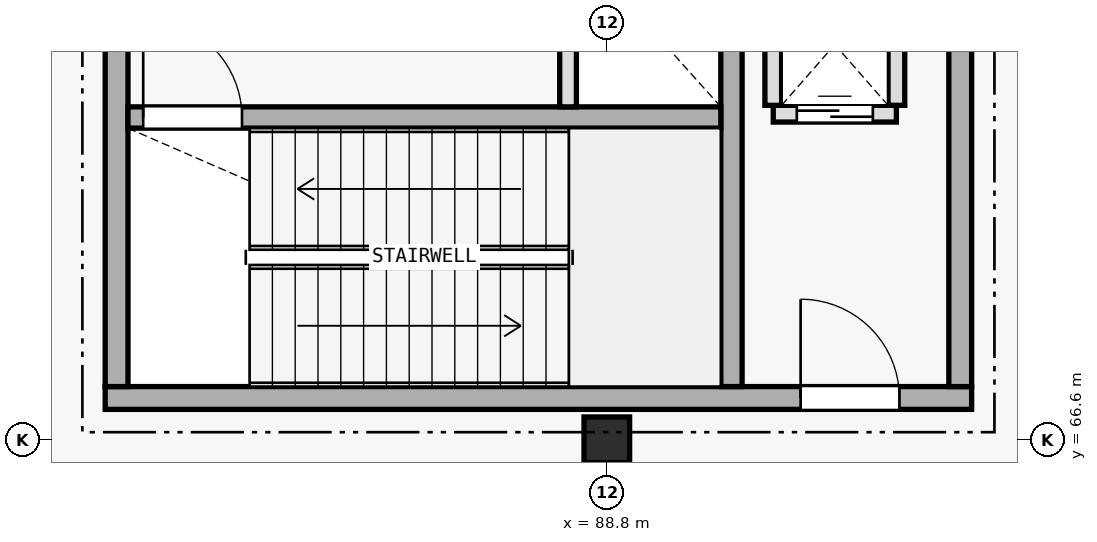
"""IFC4 building model, lengths in metres.
Left out: names, types, materials, properties, quantities, classifications, styles, units other than length and angle.
Written with IfcOpenShell. Run it as: python <this file> out.ifc"""

import sys

from ifc_helpers import new_model, si_unit, direction, frame, frame_2d, origin, origin_2d, place, context, subcontext, project, spatial, rectangle, extrude, element, fill, save


model = new_model("IFC4")
c1 = context("Model", 3, precision=1e-05, world=origin(), true_north=direction((0.0, 1.0)))
c2 = subcontext(c1, "Body", "Model", "MODEL_VIEW")
j1 = project(units=[si_unit("LENGTHUNIT", "METRE"), si_unit("PLANEANGLEUNIT", "RADIAN")], contexts=[c1])
p1 = place(None, origin())
s1 = spatial("IfcSite", under=j1, at=p1, CompositionType="ELEMENT")
p2 = place(p1, origin())
s2 = spatial("IfcBuilding", under=s1, at=p2, CompositionType="ELEMENT")
p3 = place(p2, origin())
s3 = spatial("IfcBuildingStorey", under=s2, at=p3, CompositionType="ELEMENT", Elevation=0.0)
p4 = place(p3, frame((82.2, 67.15, 0.0), z_axis=(0.0, 0.0, 1.0), x_axis=(1.0, 0.0, 0.0)))
e1 = element("IfcWall", 1, at=p4, inside=s3, PredefinedType="SHEAR", context=c2, shape_type="SweptSolid", body=[
    extrude(rectangle(XDim=11.4, YDim=0.3, at=frame_2d((5.7, 0.0))), origin(), (0.0, 0.0, 1.0), 5.395),
])
p5 = place(p4, frame((9.15, 0.0, 0.0)))
e2 = element("IfcOpeningElement", 2, at=p5, cuts=e1, PredefinedType="OPENING", context=c2, shape_type="SweptSolid", body=[
    extrude(rectangle(XDim=1.3, YDim=2.2, at=frame_2d((0.65, 1.1))), frame((0.0, 0.16, 0.0), z_axis=(0.0, -1.0, 0.0), x_axis=(1.0, 0.0, 0.0)), (0.0, 0.0, 1.0), 0.32),
])
for number, where, z_axis, x_axis in (
    (3, (82.35, 67.3, 0.0), (0.0, 0.0, 1.0), (0.0, 1.0, 0.0)),
    (4, (93.45, 67.3, 0.0), (0.0, 0.0, 1.0), (0.0, 1.0, 0.0)),
):
    element("IfcWall", number, at=place(p3, frame(where, z_axis=z_axis, x_axis=x_axis)), inside=s3, PredefinedType="SHEAR", context=c2, shape_type="SweptSolid", body=[
        extrude(rectangle(XDim=5.8, YDim=0.3, at=frame_2d((2.9, 0.0))), origin(), (0.0, 0.0, 1.0), 5.395),
    ])
p6 = place(p3, frame((90.44, 67.3, 0.0), z_axis=(0.0, 0.0, 1.0), x_axis=(0.0, 1.0, 0.0)))
e5 = element("IfcWall", 5, at=p6, inside=s3, PredefinedType="SHEAR", context=c2, shape_type="SweptSolid", body=[
    extrude(rectangle(XDim=5.8, YDim=0.28, at=frame_2d((2.9, 0.0))), origin(), (0.0, 0.0, 1.0), 5.395),
])
p7 = place(p3, frame((82.5, 70.84, 0.0), z_axis=(0.0, 0.0, 1.0), x_axis=(1.0, 0.0, 0.0)))
e6 = element("IfcWall", 6, at=p7, inside=s3, PredefinedType="SHEAR", context=c2, shape_type="SweptSolid", body=[
    extrude(rectangle(XDim=7.8, YDim=0.28, at=frame_2d((3.9, 0.0))), origin(), (0.0, 0.0, 1.0), 5.395),
])
p8 = place(p7, frame((0.2, 0.0, 0.0)))
e7 = element("IfcOpeningElement", 7, at=p8, cuts=e6, PredefinedType="OPENING", context=c2, shape_type="SweptSolid", body=[
    extrude(rectangle(XDim=1.3, YDim=2.2, at=frame_2d((0.65, 1.1))), frame((0.0, 0.15, 0.0), z_axis=(0.0, -1.0, 0.0), x_axis=(1.0, 0.0, 0.0)), (0.0, 0.0, 1.0), 0.3),
])
p9 = place(p3, frame((88.8, 66.6, 0.0), z_axis=(0.0, 0.0, 1.0), x_axis=(1.0, 0.0, 0.0)))
e8 = element("IfcColumn", 8, at=p9, inside=s3, PredefinedType="COLUMN", context=c2, shape_type="SweptSolid", body=[
    extrude(rectangle(XDim=0.6, YDim=0.6, at=origin_2d()), origin(), (0.0, 0.0, 1.0), 5.4),
])
p10 = place(p3, frame((90.99, 70.89, 0.0), z_axis=(0.0, 0.0, 1.0), x_axis=(1.0, 0.0, 0.0)))
e9 = element("IfcWall", 9, at=p10, inside=s3, PredefinedType="PLUMBINGWALL", context=c2, shape_type="SweptSolid", body=[
    extrude(rectangle(XDim=1.62, YDim=0.22, at=frame_2d((0.81, 0.0))), origin(), (0.0, 0.0, 1.0), 5.14),
])
p11 = place(p10, frame((0.31, 0.0, 0.0)))
e10 = element("IfcOpeningElement", 10, at=p11, cuts=e9, PredefinedType="OPENING", context=c2, shape_type="SweptSolid", body=[
    extrude(rectangle(XDim=1.0, YDim=2.2, at=frame_2d((0.5, 1.1))), frame((0.0, 0.12, 0.0), z_axis=(0.0, -1.0, 0.0), x_axis=(1.0, 0.0, 0.0)), (0.0, 0.0, 1.0), 0.24),
])
for number, where, z_axis, x_axis in (
    (11, (90.99, 71.0, 0.0), (0.0, 0.0, 1.0), (0.0, 1.0, 0.0)),
    (12, (92.61, 71.0, 0.0), (0.0, 0.0, 1.0), (0.0, 1.0, 0.0)),
):
    element("IfcWall", number, at=place(p3, frame(where, z_axis=z_axis, x_axis=x_axis)), inside=s3, PredefinedType="PLUMBINGWALL", context=c2, shape_type="SweptSolid", body=[
        extrude(rectangle(XDim=1.6, YDim=0.22, at=frame_2d((0.8, 0.0))), origin(), (0.0, 0.0, 1.0), 5.14),
    ])
p12 = place(p3, frame((88.29, 70.98, 0.0), z_axis=(0.0, 0.0, 1.0), x_axis=(0.0, 1.0, 0.0)))
e13 = element("IfcWall", 13, at=p12, inside=s3, PredefinedType="PLUMBINGWALL", context=c2, shape_type="SweptSolid", body=[
    extrude(rectangle(XDim=2.12, YDim=0.22, at=frame_2d((1.06, 0.0))), origin(), (0.0, 0.0, 1.0), 5.14),
])
p13 = place(p8, origin())
e14 = element("IfcDoor", 14, at=p13, inside=s3, OperationType="SINGLE_SWING_LEFT", PredefinedType="DOOR", context=c2, shape_type="SweptSolid", body=[
    extrude(rectangle(XDim=1.3, YDim=2.2, at=frame_2d((0.65, 1.1))), frame((0.0, 0.025, 0.0), z_axis=(0.0, -1.0, 0.0), x_axis=(1.0, 0.0, 0.0)), (0.0, 0.0, 1.0), 0.05),
])
fill(e7, e14)
p14 = place(p11, origin())
e15 = element("IfcDoor", 15, at=p14, inside=s3, OperationType="DOUBLE_DOOR_SLIDING", PredefinedType="DOOR", context=c2, shape_type="SweptSolid", body=[
    extrude(rectangle(XDim=1.0, YDim=2.2, at=frame_2d((0.5, 1.1))), frame((0.0, 0.025, 0.0), z_axis=(0.0, -1.0, 0.0), x_axis=(1.0, 0.0, 0.0)), (0.0, 0.0, 1.0), 0.05),
])
fill(e10, e15)
p15 = place(p5, origin())
e16 = element("IfcDoor", 16, at=p15, inside=s3, OperationType="SINGLE_SWING_LEFT", PredefinedType="DOOR", context=c2, shape_type="SweptSolid", body=[
    extrude(rectangle(XDim=1.3, YDim=2.2, at=frame_2d((0.65, 1.1))), frame((0.0, 0.025, 0.0), z_axis=(0.0, -1.0, 0.0), x_axis=(1.0, 0.0, 0.0)), (0.0, 0.0, 1.0), 0.05),
])
fill(e2, e16)
save(model, sys.argv[1])
